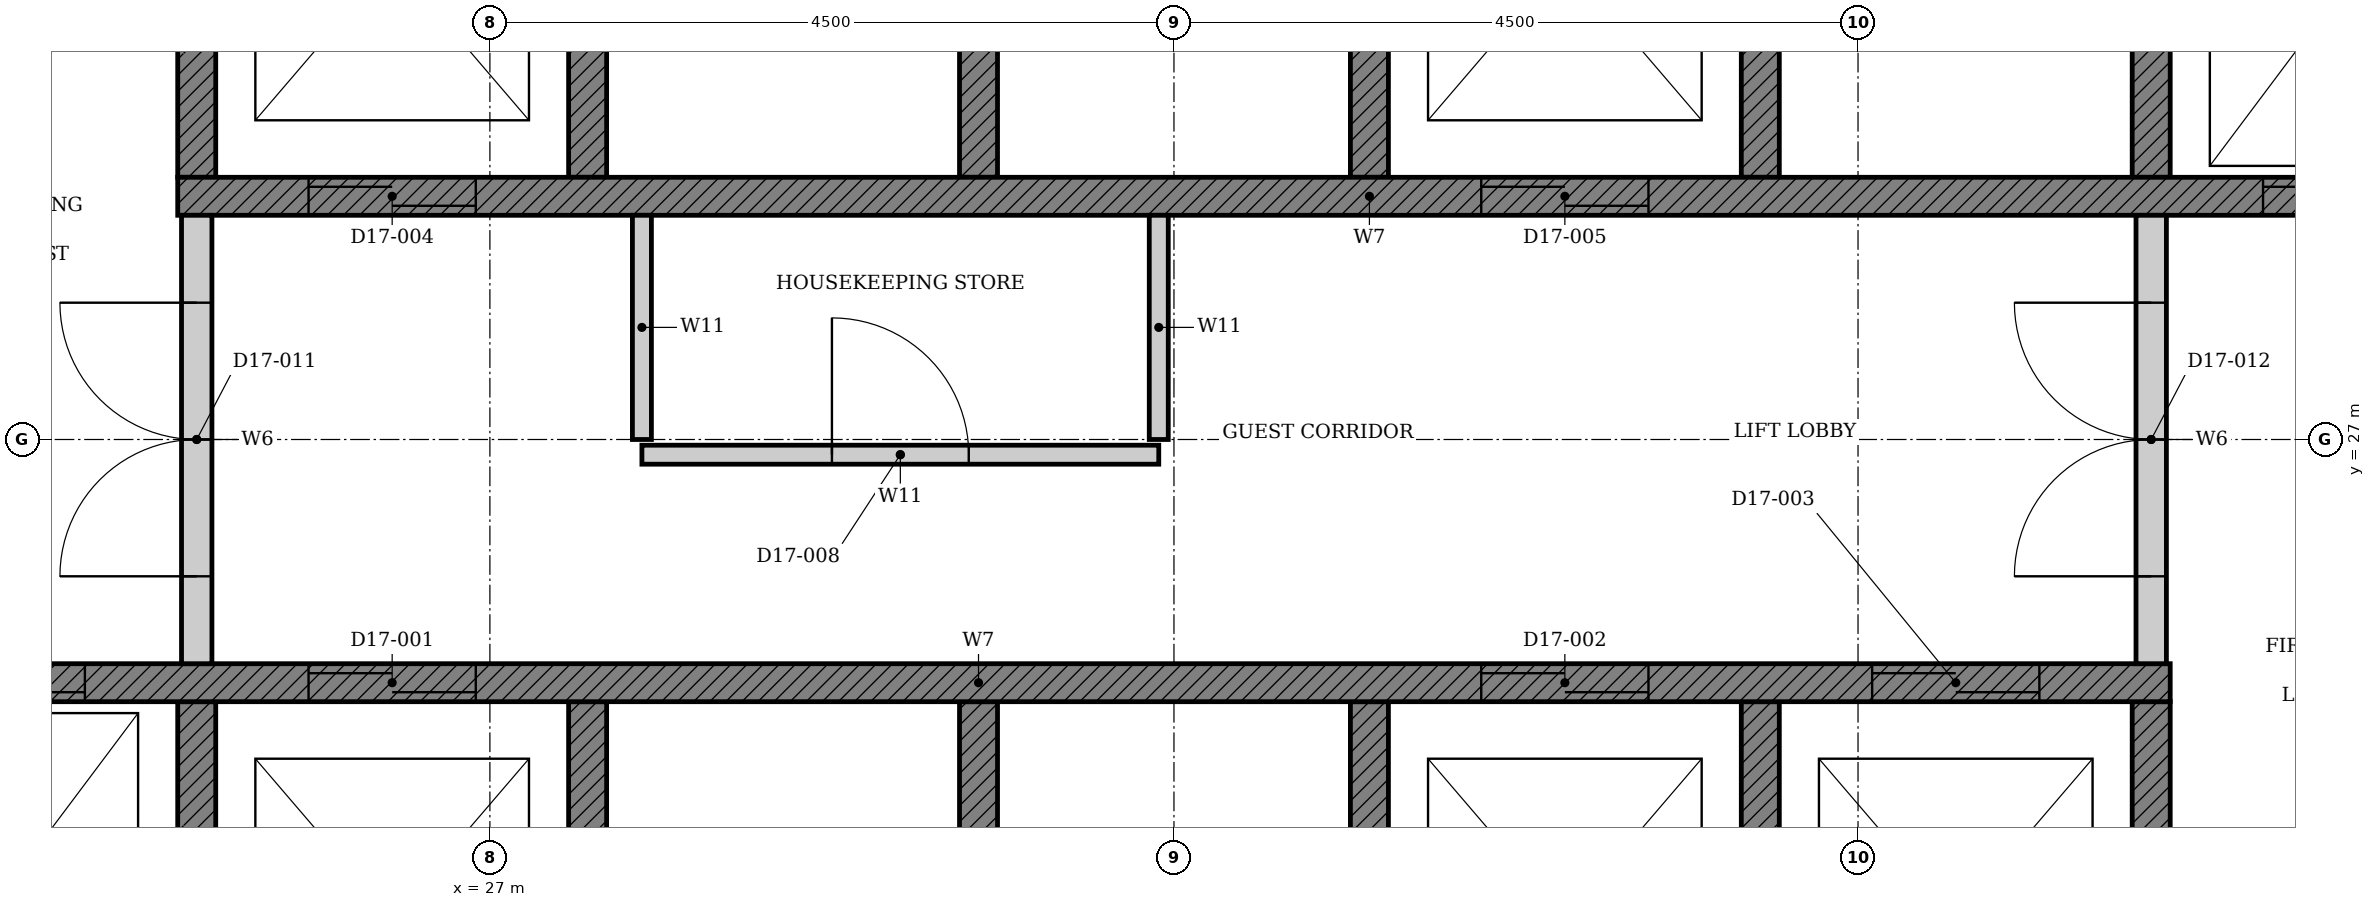
"""IFC4 building model, lengths in metres.
Left out: names, types, materials, properties, quantities, classifications, styles, units other than length and angle.
Written with IfcOpenShell. Run it as: python <this file> out.ifc"""

import sys

from ifc_helpers import new_model, si_unit, direction, frame, frame_2d, origin, place, context, subcontext, project, spatial, polyline, rectangle, outline, extrude, element, fill, save


model = new_model("IFC4")
c1 = context("Model", 3, precision=1e-05, world=origin(), true_north=direction((0.0, 1.0)))
c2 = subcontext(c1, "Body", "Model", "MODEL_VIEW")
j1 = project(units=[si_unit("LENGTHUNIT", "METRE"), si_unit("PLANEANGLEUNIT", "RADIAN")], contexts=[c1])
p1 = place(None, origin())
s1 = spatial("IfcSite", under=j1, at=p1, CompositionType="ELEMENT")
p2 = place(p1, origin())
s2 = spatial("IfcBuilding", under=s1, at=p2, CompositionType="ELEMENT")
p3 = place(p2, frame((0.0, 0.0, 74.4)))
s3 = spatial("IfcBuildingStorey", under=s2, at=p3, CompositionType="ELEMENT", Elevation=74.4)
p4 = place(p3, origin())
e1 = element("IfcWall", 1, at=p4, inside=s3, PredefinedType="SHEAR", context=c2, shape_type="SweptSolid", body=[
    extrude(outline(polyline([(22.375, 22.35), (38.053, 22.35), (38.053, 25.275), (37.803, 25.275), (37.803, 22.65), (35.482, 22.65), (35.482, 25.275), (35.232, 25.275), (35.232, 22.65), (32.911, 22.65), (32.911, 25.275), (32.661, 25.275), (32.661, 22.65), (30.339, 22.65), (30.339, 25.275), (30.089, 25.275), (30.089, 22.65), (27.768, 22.65), (27.768, 25.275), (27.518, 25.275), (27.518, 22.65), (25.197, 22.65), (25.197, 25.275), (24.947, 25.275), (24.947, 22.65), (22.625, 22.65), (22.625, 25.275), (22.375, 25.275), (22.375, 22.35)])), origin(), (0.0, 0.0, 1.0), 3.3),
])
p5 = place(p3, origin())
e2 = element("IfcWall", 2, at=p5, inside=s3, PredefinedType="SHEAR", context=c2, shape_type="SweptSolid", body=[
    extrude(outline(polyline([(24.947, 28.725), (25.197, 28.725), (25.197, 31.35), (27.518, 31.35), (27.518, 28.725), (27.768, 28.725), (27.768, 31.35), (30.089, 31.35), (30.089, 28.725), (30.339, 28.725), (30.339, 31.35), (32.661, 31.35), (32.661, 28.725), (32.911, 28.725), (32.911, 31.35), (35.232, 31.35), (35.232, 28.725), (35.482, 28.725), (35.482, 31.35), (37.803, 31.35), (37.803, 28.725), (38.053, 28.725), (38.053, 31.35), (40.375, 31.35), (40.375, 28.725), (40.625, 28.725), (40.625, 31.65), (24.947, 31.65), (24.947, 28.725)])), origin(), (0.0, 0.0, 1.0), 3.3),
])
p6 = place(p3, frame((22.375, 25.4, 0.0), z_axis=(0.0, 0.0, 1.0), x_axis=(1.0, 0.0, 0.0)))
e3 = element("IfcWall", 3, at=p6, inside=s3, PredefinedType="SHEAR", context=c2, shape_type="SweptSolid", body=[
    extrude(rectangle(XDim=15.678, YDim=0.25, at=frame_2d((7.839, 0.0))), origin(), (0.0, 0.0, 1.0), 3.3),
])
p7 = place(p6, frame((3.432, 0.0, 0.0)))
e4 = element("IfcOpeningElement", 4, at=p7, cuts=e3, PredefinedType="OPENING", context=c2, shape_type="SweptSolid", body=[
    extrude(rectangle(XDim=1.1, YDim=2.1, at=frame_2d((0.55, 1.05))), frame((0.0, 0.135, 0.0), z_axis=(0.0, -1.0, 0.0), x_axis=(1.0, 0.0, 0.0)), (0.0, 0.0, 1.0), 0.27),
])
p8 = place(p6, frame((11.146, 0.0, 0.0)))
e5 = element("IfcOpeningElement", 5, at=p8, cuts=e3, PredefinedType="OPENING", context=c2, shape_type="SweptSolid", body=[
    extrude(rectangle(XDim=1.1, YDim=2.1, at=frame_2d((0.55, 1.05))), frame((0.0, 0.135, 0.0), z_axis=(0.0, -1.0, 0.0), x_axis=(1.0, 0.0, 0.0)), (0.0, 0.0, 1.0), 0.27),
])
p9 = place(p6, frame((13.718, 0.0, 0.0)))
e6 = element("IfcOpeningElement", 6, at=p9, cuts=e3, PredefinedType="OPENING", context=c2, shape_type="SweptSolid", body=[
    extrude(rectangle(XDim=1.1, YDim=2.1, at=frame_2d((0.55, 1.05))), frame((0.0, 0.135, 0.0), z_axis=(0.0, -1.0, 0.0), x_axis=(1.0, 0.0, 0.0)), (0.0, 0.0, 1.0), 0.27),
])
p10 = place(p6, frame((0.861, 0.0, 0.0)))
e7 = element("IfcOpeningElement", 7, at=p10, cuts=e3, PredefinedType="OPENING", context=c2, shape_type="SweptSolid", body=[
    extrude(rectangle(XDim=1.1, YDim=2.1, at=frame_2d((0.55, 1.05))), frame((0.0, 0.135, 0.0), z_axis=(0.0, -1.0, 0.0), x_axis=(1.0, 0.0, 0.0)), (0.0, 0.0, 1.0), 0.27),
])
p11 = place(p3, frame((24.947, 28.6, 0.0), z_axis=(0.0, 0.0, 1.0), x_axis=(1.0, 0.0, 0.0)))
e8 = element("IfcWall", 8, at=p11, inside=s3, PredefinedType="SHEAR", context=c2, shape_type="SweptSolid", body=[
    extrude(rectangle(XDim=15.678, YDim=0.25, at=frame_2d((7.839, 0.0))), origin(), (0.0, 0.0, 1.0), 3.3),
])
p12 = place(p11, frame((0.861, 0.0, 0.0)))
e9 = element("IfcOpeningElement", 9, at=p12, cuts=e8, PredefinedType="OPENING", context=c2, shape_type="SweptSolid", body=[
    extrude(rectangle(XDim=1.1, YDim=2.1, at=frame_2d((0.55, 1.05))), frame((0.0, 0.135, 0.0), z_axis=(0.0, -1.0, 0.0), x_axis=(1.0, 0.0, 0.0)), (0.0, 0.0, 1.0), 0.27),
])
p13 = place(p11, frame((8.575, 0.0, 0.0)))
e10 = element("IfcOpeningElement", 10, at=p13, cuts=e8, PredefinedType="OPENING", context=c2, shape_type="SweptSolid", body=[
    extrude(rectangle(XDim=1.1, YDim=2.1, at=frame_2d((0.55, 1.05))), frame((0.0, 0.135, 0.0), z_axis=(0.0, -1.0, 0.0), x_axis=(1.0, 0.0, 0.0)), (0.0, 0.0, 1.0), 0.27),
])
p14 = place(p11, frame((13.718, 0.0, 0.0)))
e11 = element("IfcOpeningElement", 11, at=p14, cuts=e8, PredefinedType="OPENING", context=c2, shape_type="SweptSolid", body=[
    extrude(rectangle(XDim=1.1, YDim=2.1, at=frame_2d((0.55, 1.05))), frame((0.0, 0.135, 0.0), z_axis=(0.0, -1.0, 0.0), x_axis=(1.0, 0.0, 0.0)), (0.0, 0.0, 1.0), 0.27),
])
p15 = place(p3, frame((28.0, 26.9, 0.0), z_axis=(0.0, 0.0, 1.0), x_axis=(1.0, 0.0, 0.0)))
e12 = element("IfcWall", 12, at=p15, inside=s3, PredefinedType="PARTITIONING", context=c2, shape_type="SweptSolid", body=[
    extrude(rectangle(XDim=3.4, YDim=0.125, at=frame_2d((1.7, 0.0))), origin(), (0.0, 0.0, 1.0), 3.3),
])
p16 = place(p15, frame((1.25, 0.0, 0.0)))
e13 = element("IfcOpeningElement", 13, at=p16, cuts=e12, PredefinedType="OPENING", context=c2, shape_type="SweptSolid", body=[
    extrude(rectangle(XDim=0.9, YDim=2.1, at=frame_2d((0.45, 1.05))), frame((0.0, 0.073, 0.0), z_axis=(0.0, -1.0, 0.0), x_axis=(1.0, 0.0, 0.0)), (0.0, 0.0, 1.0), 0.145),
])
for number, where, z_axis, x_axis in (
    (14, (28.0, 28.475, 0.0), (0.0, 0.0, 1.0), (0.0, -1.0, 0.0)),
    (15, (31.4, 28.475, 0.0), (0.0, 0.0, 1.0), (0.0, -1.0, 0.0)),
):
    element("IfcWall", number, at=place(p3, frame(where, z_axis=z_axis, x_axis=x_axis)), inside=s3, PredefinedType="PARTITIONING", context=c2, shape_type="SweptSolid", body=[
        extrude(rectangle(XDim=1.475, YDim=0.125, at=frame_2d((0.738, 0.0))), origin(), (0.0, 0.0, 1.0), 3.3),
    ])
p17 = place(p3, frame((25.072, 25.525, 0.0), z_axis=(0.0, 0.0, 1.0), x_axis=(0.0, 1.0, 0.0)))
e16 = element("IfcWall", 16, at=p17, inside=s3, PredefinedType="PARTITIONING", context=c2, shape_type="SweptSolid", body=[
    extrude(rectangle(XDim=2.95, YDim=0.2, at=frame_2d((1.475, 0.0))), origin(), (0.0, 0.0, 1.0), 3.3),
])
p18 = place(p17, frame((0.575, 0.0, 0.0)))
e17 = element("IfcOpeningElement", 17, at=p18, cuts=e16, PredefinedType="OPENING", context=c2, shape_type="SweptSolid", body=[
    extrude(rectangle(XDim=1.8, YDim=2.1, at=frame_2d((0.9, 1.05))), frame((0.0, 0.11, 0.0), z_axis=(0.0, -1.0, 0.0), x_axis=(1.0, 0.0, 0.0)), (0.0, 0.0, 1.0), 0.22),
])
p19 = place(p3, frame((37.928, 25.525, 0.0), z_axis=(0.0, 0.0, 1.0), x_axis=(0.0, 1.0, 0.0)))
e18 = element("IfcWall", 18, at=p19, inside=s3, PredefinedType="PARTITIONING", context=c2, shape_type="SweptSolid", body=[
    extrude(rectangle(XDim=2.95, YDim=0.2, at=frame_2d((1.475, 0.0))), origin(), (0.0, 0.0, 1.0), 3.3),
])
p20 = place(p19, frame((0.575, 0.0, 0.0)))
e19 = element("IfcOpeningElement", 19, at=p20, cuts=e18, PredefinedType="OPENING", context=c2, shape_type="SweptSolid", body=[
    extrude(rectangle(XDim=1.8, YDim=2.1, at=frame_2d((0.9, 1.05))), frame((0.0, 0.11, 0.0), z_axis=(0.0, -1.0, 0.0), x_axis=(1.0, 0.0, 0.0)), (0.0, 0.0, 1.0), 0.22),
])
p21 = place(p7, origin())
e20 = element("IfcDoor", 20, at=p21, inside=s3, OperationType="DOUBLE_DOOR_SLIDING", PredefinedType="DOOR", context=c2, shape_type="SweptSolid", body=[
    extrude(rectangle(XDim=1.1, YDim=2.1, at=frame_2d((0.55, 1.05))), frame((0.0, 0.025, 0.0), z_axis=(0.0, -1.0, 0.0), x_axis=(1.0, 0.0, 0.0)), (0.0, 0.0, 1.0), 0.05),
])
fill(e4, e20)
p22 = place(p8, origin())
e21 = element("IfcDoor", 21, at=p22, inside=s3, OperationType="DOUBLE_DOOR_SLIDING", PredefinedType="DOOR", context=c2, shape_type="SweptSolid", body=[
    extrude(rectangle(XDim=1.1, YDim=2.1, at=frame_2d((0.55, 1.05))), frame((0.0, 0.025, 0.0), z_axis=(0.0, -1.0, 0.0), x_axis=(1.0, 0.0, 0.0)), (0.0, 0.0, 1.0), 0.05),
])
fill(e5, e21)
p23 = place(p9, origin())
e22 = element("IfcDoor", 22, at=p23, inside=s3, OperationType="DOUBLE_DOOR_SLIDING", PredefinedType="DOOR", context=c2, shape_type="SweptSolid", body=[
    extrude(rectangle(XDim=1.1, YDim=2.1, at=frame_2d((0.55, 1.05))), frame((0.0, 0.025, 0.0), z_axis=(0.0, -1.0, 0.0), x_axis=(1.0, 0.0, 0.0)), (0.0, 0.0, 1.0), 0.05),
])
fill(e6, e22)
p24 = place(p12, origin())
e23 = element("IfcDoor", 23, at=p24, inside=s3, OperationType="DOUBLE_DOOR_SLIDING", PredefinedType="DOOR", context=c2, shape_type="SweptSolid", body=[
    extrude(rectangle(XDim=1.1, YDim=2.1, at=frame_2d((0.55, 1.05))), frame((0.0, 0.025, 0.0), z_axis=(0.0, -1.0, 0.0), x_axis=(1.0, 0.0, 0.0)), (0.0, 0.0, 1.0), 0.05),
])
fill(e9, e23)
p25 = place(p13, origin())
e24 = element("IfcDoor", 24, at=p25, inside=s3, OperationType="DOUBLE_DOOR_SLIDING", PredefinedType="DOOR", context=c2, shape_type="SweptSolid", body=[
    extrude(rectangle(XDim=1.1, YDim=2.1, at=frame_2d((0.55, 1.05))), frame((0.0, 0.025, 0.0), z_axis=(0.0, -1.0, 0.0), x_axis=(1.0, 0.0, 0.0)), (0.0, 0.0, 1.0), 0.05),
])
fill(e10, e24)
p26 = place(p10, origin())
e25 = element("IfcDoor", 25, at=p26, inside=s3, OperationType="DOUBLE_DOOR_SLIDING", PredefinedType="DOOR", context=c2, shape_type="SweptSolid", body=[
    extrude(rectangle(XDim=1.1, YDim=2.1, at=frame_2d((0.55, 1.05))), frame((0.0, 0.025, 0.0), z_axis=(0.0, -1.0, 0.0), x_axis=(1.0, 0.0, 0.0)), (0.0, 0.0, 1.0), 0.05),
])
fill(e7, e25)
p27 = place(p14, origin())
e26 = element("IfcDoor", 26, at=p27, inside=s3, OperationType="DOUBLE_DOOR_SLIDING", PredefinedType="DOOR", context=c2, shape_type="SweptSolid", body=[
    extrude(rectangle(XDim=1.1, YDim=2.1, at=frame_2d((0.55, 1.05))), frame((0.0, 0.025, 0.0), z_axis=(0.0, -1.0, 0.0), x_axis=(1.0, 0.0, 0.0)), (0.0, 0.0, 1.0), 0.05),
])
fill(e11, e26)
p28 = place(p16, origin())
e27 = element("IfcDoor", 27, at=p28, inside=s3, OperationType="SINGLE_SWING_LEFT", PredefinedType="DOOR", context=c2, shape_type="SweptSolid", body=[
    extrude(rectangle(XDim=0.9, YDim=2.1, at=frame_2d((0.45, 1.05))), frame((0.0, 0.025, 0.0), z_axis=(0.0, -1.0, 0.0), x_axis=(1.0, 0.0, 0.0)), (0.0, 0.0, 1.0), 0.05),
])
fill(e13, e27)
p29 = place(p18, origin())
e28 = element("IfcDoor", 28, at=p29, inside=s3, OperationType="DOUBLE_DOOR_SINGLE_SWING", PredefinedType="DOOR", context=c2, shape_type="SweptSolid", body=[
    extrude(rectangle(XDim=1.8, YDim=2.1, at=frame_2d((0.9, 1.05))), frame((0.0, 0.025, 0.0), z_axis=(0.0, -1.0, 0.0), x_axis=(1.0, 0.0, 0.0)), (0.0, 0.0, 1.0), 0.05),
])
fill(e17, e28)
p30 = place(p20, origin())
e29 = element("IfcDoor", 29, at=p30, inside=s3, OperationType="DOUBLE_DOOR_SINGLE_SWING", PredefinedType="DOOR", context=c2, shape_type="SweptSolid", body=[
    extrude(rectangle(XDim=1.8, YDim=2.1, at=frame_2d((0.9, 1.05))), frame((0.0, 0.025, 0.0), z_axis=(0.0, -1.0, 0.0), x_axis=(1.0, 0.0, 0.0)), (0.0, 0.0, 1.0), 0.05),
])
fill(e19, e29)
save(model, sys.argv[1])
